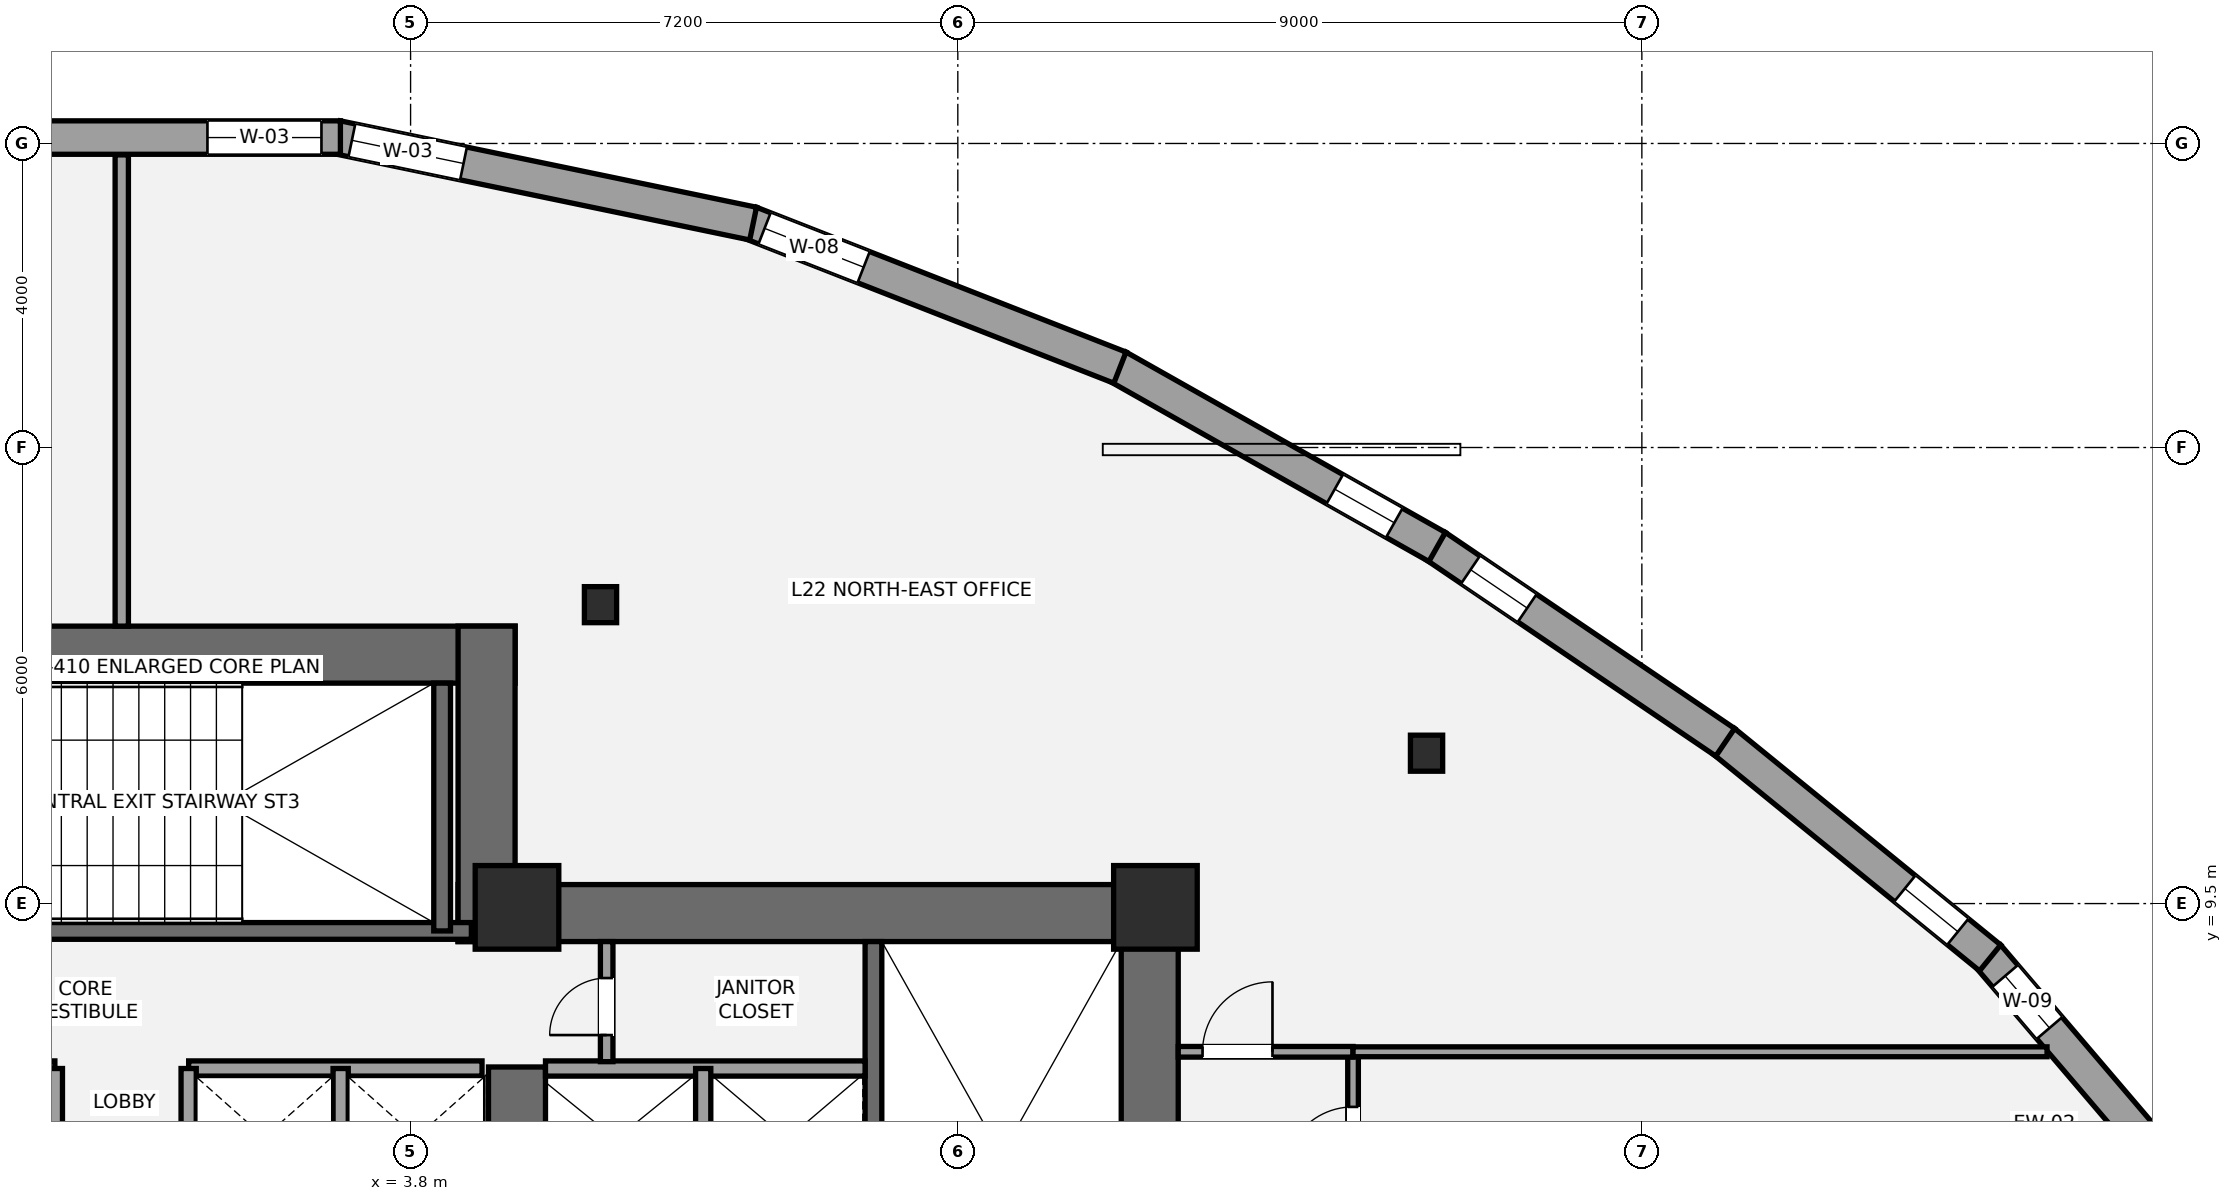
"""IFC4 building model, lengths in metres.
Left out: names, types, materials, properties, quantities, classifications, styles, units other than length and angle.
Written with IfcOpenShell. Run it as: python <this file> out.ifc"""

import sys

from ifc_helpers import new_model, si_unit, direction, frame, frame_2d, origin, origin_2d, place, context, subcontext, project, spatial, rectangle, i_section, extrude, element, fill, save


model = new_model("IFC4")
c1 = context("Model", 3, precision=1e-05, world=origin(), true_north=direction((0.0, 1.0)))
c2 = subcontext(c1, "Body", "Model", "MODEL_VIEW")
j1 = project(units=[si_unit("LENGTHUNIT", "METRE"), si_unit("PLANEANGLEUNIT", "RADIAN")], contexts=[c1])
p1 = place(None, origin())
s1 = spatial("IfcSite", under=j1, at=p1, CompositionType="ELEMENT")
p2 = place(p1, origin())
s2 = spatial("IfcBuilding", under=s1, at=p2, CompositionType="ELEMENT")
p3 = place(p2, frame((0.0, 0.0, 86.1)))
s3 = spatial("IfcBuildingStorey", under=s2, at=p3, CompositionType="ELEMENT", Elevation=86.1)
p4 = place(p3, frame((13.525, 1.1, 0.0), z_axis=(0.0, 0.0, 1.0), x_axis=(0.0, 1.0, 0.0)))
e1 = element("IfcWall", 1, at=p4, inside=s3, PredefinedType="SHEAR", context=c2, shape_type="SweptSolid", body=[
    extrude(rectangle(XDim=8.65, YDim=0.75, at=frame_2d((4.325, 0.0))), origin(), (0.0, 0.0, 1.0), 3.5),
])
p5 = place(p3, frame((4.425, 9.375, 0.0), z_axis=(0.0, 0.0, 1.0), x_axis=(1.0, 0.0, 0.0)))
e2 = element("IfcWall", 2, at=p5, inside=s3, PredefinedType="SHEAR", context=c2, shape_type="SweptSolid", body=[
    extrude(rectangle(XDim=9.475, YDim=0.75, at=frame_2d((4.737, 0.0))), origin(), (0.0, 0.0, 1.0), 3.5),
])
p6 = place(p3, frame((5.2, 5.35, 0.0), z_axis=(0.0, 0.0, 1.0), x_axis=(0.0, 1.0, 0.0)))
e3 = element("IfcWall", 3, at=p6, inside=s3, PredefinedType="SHEAR", context=c2, shape_type="SweptSolid", body=[
    extrude(rectangle(XDim=2.0, YDim=0.75, at=frame_2d((1.0, 0.0))), origin(), (0.0, 0.0, 1.0), 3.5),
])
p7 = place(p3, frame((9.89, 1.85, 0.0), z_axis=(0.0, 0.0, 1.0), x_axis=(0.0, 1.0, 0.0)))
e4 = element("IfcWall", 4, at=p7, inside=s3, PredefinedType="SHEAR", context=c2, shape_type="SweptSolid", body=[
    extrude(rectangle(XDim=7.15, YDim=0.22, at=frame_2d((3.575, 0.0))), origin(), (0.0, 0.0, 1.0), 3.5),
])
p8 = place(p3, frame((-5.175, 12.775, 0.0), z_axis=(0.0, 0.0, 1.0), x_axis=(1.0, 0.0, 0.0)))
e5 = element("IfcWall", 5, at=p8, inside=s3, PredefinedType="SHEAR", context=c2, shape_type="SweptSolid", body=[
    extrude(rectangle(XDim=10.35, YDim=0.75, at=frame_2d((5.175, 0.0))), origin(), (0.0, 0.0, 1.0), 3.5),
])
p9 = place(p3, frame((4.8, 9.0, 0.0), z_axis=(0.0, 0.0, 1.0), x_axis=(0.0, 1.0, 0.0)))
e6 = element("IfcWall", 6, at=p9, inside=s3, PredefinedType="SHEAR", context=c2, shape_type="SweptSolid", body=[
    extrude(rectangle(XDim=4.15, YDim=0.75, at=frame_2d((2.075, 0.0))), origin(), (0.0, 0.0, 1.0), 3.5),
])
p10 = place(p3, frame((-4.7, 9.14, 0.0), z_axis=(0.0, 0.0, 1.0), x_axis=(1.0, 0.0, 0.0)))
e7 = element("IfcWall", 7, at=p10, inside=s3, PredefinedType="SHEAR", context=c2, shape_type="SweptSolid", body=[
    extrude(rectangle(XDim=9.3, YDim=0.22, at=frame_2d((4.65, 0.0))), origin(), (0.0, 0.0, 1.0), 3.5),
])
p11 = place(p10, frame((1.15, 0.0, 0.0)))
e8 = element("IfcOpeningElement", 8, at=p11, cuts=e7, PredefinedType="OPENING", context=c2, shape_type="SweptSolid", body=[
    extrude(rectangle(XDim=1.05, YDim=2.15, at=frame_2d((0.525, 1.075))), frame((0.0, 0.12, 0.0), z_axis=(0.0, -1.0, 0.0), x_axis=(1.0, 0.0, 0.0)), (0.0, 0.0, 1.0), 0.24),
])
p12 = place(p3, frame((4.215, 9.14, 0.0), z_axis=(0.0, 0.0, 1.0), x_axis=(0.0, 1.0, 0.0)))
e9 = element("IfcWall", 9, at=p12, inside=s3, PredefinedType="SHEAR", context=c2, shape_type="SweptSolid", body=[
    extrude(rectangle(XDim=3.26, YDim=0.22, at=frame_2d((1.63, 0.0))), origin(), (0.0, 0.0, 1.0), 3.5),
])
for number, where, z_axis, x_axis in (
    (10, (5.2, 9.45, 0.0), (0.0, 0.0, 1.0), (1.0, 0.0, 0.0)),
    (11, (13.6, 9.45, 0.0), (0.0, 0.0, 1.0), (1.0, 0.0, 0.0)),
):
    element("IfcColumn", number, at=place(p3, frame(where, z_axis=z_axis, x_axis=x_axis)), inside=s3, PredefinedType="COLUMN", context=c2, shape_type="SweptSolid", body=[
        extrude(rectangle(XDim=1.1, YDim=1.1, at=origin_2d()), origin(), (0.0, 0.0, 1.0), 3.5),
    ])
for number, where, z_axis, x_axis in (
    (12, (17.167, 11.478, 0.0), (0.0, 0.0, 1.0), (1.0, 0.0, 0.0)),
    (13, (6.299, 13.433, 0.0), (0.0, 0.0, 1.0), (1.0, 0.0, 0.0)),
):
    element("IfcColumn", number, at=place(p3, frame(where, z_axis=z_axis, x_axis=x_axis)), inside=s3, PredefinedType="COLUMN", context=c2, shape_type="SweptSolid", body=[
        extrude(i_section(OverallWidth=0.424, OverallDepth=0.474, WebThickness=0.048, FlangeThickness=0.077, at=origin_2d()), origin(), (0.0, 0.0, 1.0), 3.5),
    ])
p13 = place(p3, frame((24.553, 8.813, 0.0), z_axis=(0.0, 0.0, 1.0), x_axis=(0.648913975558, -0.760861782669, 0.0)))
e14 = element("IfcWall", 14, at=p13, inside=s3, PredefinedType="STANDARD", context=c2, shape_type="SweptSolid", body=[
    extrude(rectangle(XDim=4.331, YDim=0.44, at=frame_2d((2.166, 0.0))), origin(), (0.0, 0.0, 1.0), 2.528),
])
p14 = place(p13, frame((0.349, 0.0, 0.58)))
e15 = element("IfcOpeningElement", 15, at=p14, cuts=e14, PredefinedType="OPENING", context=c2, shape_type="SweptSolid", body=[
    extrude(rectangle(XDim=0.9, YDim=1.35, at=frame_2d((0.45, 0.675))), frame((0.0, 0.23, 0.0), z_axis=(0.0, -1.0, 0.0), x_axis=(1.0, 0.0, 0.0)), (0.0, 0.0, 1.0), 0.46),
])
p15 = place(p3, frame((21.081, 11.633, 0.0), z_axis=(0.0, 0.0, 1.0), x_axis=(0.775728286929, -0.631067052585, 0.0)))
e16 = element("IfcWall", 16, at=p15, inside=s3, PredefinedType="STANDARD", context=c2, shape_type="SweptSolid", body=[
    extrude(rectangle(XDim=4.513, YDim=0.44, at=frame_2d((2.256, 0.0))), origin(), (0.0, 0.0, 1.0), 2.528),
])
p16 = place(p15, frame((3.067, 0.0, 0.58)))
e17 = element("IfcOpeningElement", 17, at=p16, cuts=e16, PredefinedType="OPENING", context=c2, shape_type="SweptSolid", body=[
    extrude(rectangle(XDim=0.9, YDim=1.35, at=frame_2d((0.45, 0.675))), frame((0.0, 0.23, 0.0), z_axis=(0.0, -1.0, 0.0), x_axis=(1.0, 0.0, 0.0)), (0.0, 0.0, 1.0), 0.46),
])
p17 = place(p3, frame((17.291, 14.201, 0.0), z_axis=(0.0, 0.0, 1.0), x_axis=(0.827777061901, -0.561057159112, 0.0)))
e18 = element("IfcWall", 18, at=p17, inside=s3, PredefinedType="STANDARD", context=c2, shape_type="SweptSolid", body=[
    extrude(rectangle(XDim=4.597, YDim=0.44, at=frame_2d((2.298, 0.0))), origin(), (0.0, 0.0, 1.0), 2.528),
])
p18 = place(p17, frame((0.55, 0.0, 0.58)))
e19 = element("IfcOpeningElement", 19, at=p18, cuts=e18, PredefinedType="OPENING", context=c2, shape_type="SweptSolid", body=[
    extrude(rectangle(XDim=0.9, YDim=1.35, at=frame_2d((0.45, 0.675))), frame((0.0, 0.23, 0.0), z_axis=(0.0, -1.0, 0.0), x_axis=(1.0, 0.0, 0.0)), (0.0, 0.0, 1.0), 0.46),
])
p19 = place(p3, frame((13.105, 16.564, 0.0), z_axis=(0.0, 0.0, 1.0), x_axis=(0.870732411856, -0.491757121903, 0.0)))
e20 = element("IfcWall", 20, at=p19, inside=s3, PredefinedType="STANDARD", context=c2, shape_type="SweptSolid", body=[
    extrude(rectangle(XDim=4.825, YDim=0.44, at=frame_2d((2.413, 0.0))), origin(), (0.0, 0.0, 1.0), 2.528),
])
p20 = place(p19, frame((3.278, 0.0, 0.58)))
e21 = element("IfcOpeningElement", 21, at=p20, cuts=e20, PredefinedType="OPENING", context=c2, shape_type="SweptSolid", body=[
    extrude(rectangle(XDim=0.9, YDim=1.35, at=frame_2d((0.45, 0.675))), frame((0.0, 0.23, 0.0), z_axis=(0.0, -1.0, 0.0), x_axis=(1.0, 0.0, 0.0)), (0.0, 0.0, 1.0), 0.46),
])
p21 = place(p3, frame((8.271, 18.456, 0.0), z_axis=(0.0, 0.0, 1.0), x_axis=(0.931059171354, -0.364868222017, 0.0)))
e22 = element("IfcWall", 22, at=p21, inside=s3, PredefinedType="STANDARD", context=c2, shape_type="SweptSolid", body=[
    extrude(rectangle(XDim=5.222, YDim=0.44, at=frame_2d((2.611, 0.0))), origin(), (0.0, 0.0, 1.0), 2.528),
])
p22 = place(p21, frame((0.2, 0.0, 0.58)))
e23 = element("IfcOpeningElement", 23, at=p22, cuts=e22, PredefinedType="OPENING", context=c2, shape_type="SweptSolid", body=[
    extrude(rectangle(XDim=1.4, YDim=1.55, at=frame_2d((0.7, 0.775))), frame((0.0, 0.23, 0.0), z_axis=(0.0, -1.0, 0.0), x_axis=(1.0, 0.0, 0.0)), (0.0, 0.0, 1.0), 0.46),
])
p23 = place(p3, frame((2.832, 19.582, 0.0), z_axis=(0.0, 0.0, 1.0), x_axis=(0.979118590293, -0.20328990664, 0.0)))
e24 = element("IfcWall", 24, at=p23, inside=s3, PredefinedType="STANDARD", context=c2, shape_type="SweptSolid", body=[
    extrude(rectangle(XDim=5.592, YDim=0.44, at=frame_2d((2.796, 0.0))), origin(), (0.0, 0.0, 1.0), 2.528),
])
p24 = place(p23, frame((0.2, 0.0, 0.65)))
e25 = element("IfcOpeningElement", 25, at=p24, cuts=e24, PredefinedType="OPENING", context=c2, shape_type="SweptSolid", body=[
    extrude(rectangle(XDim=1.5, YDim=1.7, at=frame_2d((0.75, 0.85))), frame((0.0, 0.23, 0.0), z_axis=(0.0, -1.0, 0.0), x_axis=(1.0, 0.0, 0.0)), (0.0, 0.0, 1.0), 0.46),
])
p25 = place(p3, frame((-2.877, 19.578, 0.0), z_axis=(0.0, 0.0, 1.0), x_axis=(1.0, 0.0, 0.0)))
e26 = element("IfcWall", 26, at=p25, inside=s3, PredefinedType="STANDARD", context=c2, shape_type="SweptSolid", body=[
    extrude(rectangle(XDim=5.753, YDim=0.44, at=frame_2d((2.877, 0.0))), origin(), (0.0, 0.0, 1.0), 2.528),
])
p26 = place(p25, frame((4.004, 0.0, 0.65)))
e27 = element("IfcOpeningElement", 27, at=p26, cuts=e26, PredefinedType="OPENING", context=c2, shape_type="SweptSolid", body=[
    extrude(rectangle(XDim=1.5, YDim=1.7, at=frame_2d((0.75, 0.85))), frame((0.0, 0.23, 0.0), z_axis=(0.0, -1.0, 0.0), x_axis=(1.0, 0.0, 0.0)), (0.0, 0.0, 1.0), 0.46),
])
p27 = place(p3, frame((5.575, 7.33, 0.0), z_axis=(0.0, 0.0, 1.0), x_axis=(1.0, 0.0, 0.0)))
e28 = element("IfcWall", 28, at=p27, inside=s3, PredefinedType="SOLIDWALL", context=c2, shape_type="SweptSolid", body=[
    extrude(rectangle(XDim=4.205, YDim=0.2, at=frame_2d((2.103, 0.0))), origin(), (0.0, 0.0, 1.0), 3.31),
])
p28 = place(p3, frame((7.65, 5.47, 0.0), z_axis=(0.0, 0.0, 1.0), x_axis=(0.0, 1.0, 0.0)))
e29 = element("IfcWall", 29, at=p28, inside=s3, PredefinedType="SOLIDWALL", context=c2, shape_type="SweptSolid", body=[
    extrude(rectangle(XDim=1.86, YDim=0.2, at=frame_2d((0.93, 0.0))), origin(), (0.0, 0.0, 1.0), 3.31),
])
for number, where, z_axis, x_axis in (
    (30, (-4.74, 7.33, 0.0), (0.0, 0.0, 1.0), (1.0, 0.0, 0.0)),
    (31, (0.88, 7.33, 0.0), (0.0, 0.0, 1.0), (1.0, 0.0, 0.0)),
):
    element("IfcWall", number, at=place(p3, frame(where, z_axis=z_axis, x_axis=x_axis)), inside=s3, PredefinedType="SOLIDWALL", context=c2, shape_type="SweptSolid", body=[
        extrude(rectangle(XDim=3.86, YDim=0.2, at=frame_2d((1.93, 0.0))), origin(), (0.0, 0.0, 1.0), 3.31),
    ])
for number, where, z_axis, x_axis in (
    (32, (2.88, 5.52, 0.0), (0.0, 0.0, 1.0), (0.0, 1.0, 0.0)),
    (33, (-0.88, 5.52, 0.0), (0.0, 0.0, 1.0), (0.0, 1.0, 0.0)),
    (34, (0.88, 5.52, 0.0), (0.0, 0.0, 1.0), (0.0, 1.0, 0.0)),
):
    element("IfcWall", number, at=place(p3, frame(where, z_axis=z_axis, x_axis=x_axis)), inside=s3, PredefinedType="SOLIDWALL", context=c2, shape_type="SweptSolid", body=[
        extrude(rectangle(XDim=1.81, YDim=0.2, at=frame_2d((0.905, 0.0))), origin(), (0.0, 0.0, 1.0), 3.31),
    ])
p29 = place(p3, frame((6.38, 7.42, 0.0), z_axis=(0.0, 0.0, 1.0), x_axis=(0.0, 1.0, 0.0)))
e35 = element("IfcWall", 35, at=p29, inside=s3, PredefinedType="PARTITIONING", context=c2, shape_type="SweptSolid", body=[
    extrude(rectangle(XDim=1.58, YDim=0.165, at=frame_2d((0.79, 0.0))), origin(), (0.0, 0.0, 1.0), 3.31),
])
p30 = place(p29, frame((0.35, 0.0, 0.0)))
e36 = element("IfcOpeningElement", 36, at=p30, cuts=e35, PredefinedType="OPENING", context=c2, shape_type="SweptSolid", body=[
    extrude(rectangle(XDim=0.75, YDim=2.1, at=frame_2d((0.375, 1.05))), frame((0.0, 0.093, 0.0), z_axis=(0.0, -1.0, 0.0), x_axis=(1.0, 0.0, 0.0)), (0.0, 0.0, 1.0), 0.185),
])
p31 = place(p3, frame((16.2, -14.554, 0.0), z_axis=(0.0, 0.0, 1.0), x_axis=(0.0, 1.0, 0.0)))
e37 = element("IfcWall", 37, at=p31, inside=s3, PredefinedType="PARTITIONING", context=c2, shape_type="SweptSolid", body=[
    extrude(rectangle(XDim=22.104, YDim=0.14, at=frame_2d((11.052, 0.0))), origin(), (0.0, 0.0, 1.0), 2.751),
])
p32 = place(p31, frame((10.304, 0.0, 0.0)))
e38 = element("IfcOpeningElement", 38, at=p32, cuts=e37, PredefinedType="OPENING", context=c2, shape_type="SweptSolid", body=[
    extrude(rectangle(XDim=0.9, YDim=2.1, at=frame_2d((0.45, 1.05))), frame((0.0, 0.08, 0.0), z_axis=(0.0, -1.0, 0.0), x_axis=(1.0, 0.0, 0.0)), (0.0, 0.0, 1.0), 0.16),
])
p33 = place(p31, frame((14.204, 0.0, 0.0)))
e39 = element("IfcOpeningElement", 39, at=p33, cuts=e37, PredefinedType="OPENING", context=c2, shape_type="SweptSolid", body=[
    extrude(rectangle(XDim=0.9, YDim=2.1, at=frame_2d((0.45, 1.05))), frame((0.0, 0.08, 0.0), z_axis=(0.0, -1.0, 0.0), x_axis=(1.0, 0.0, 0.0)), (0.0, 0.0, 1.0), 0.16),
])
p34 = place(p31, frame((17.704, 0.0, 0.0)))
e40 = element("IfcOpeningElement", 40, at=p34, cuts=e37, PredefinedType="OPENING", context=c2, shape_type="SweptSolid", body=[
    extrude(rectangle(XDim=0.9, YDim=2.1, at=frame_2d((0.45, 1.05))), frame((0.0, 0.08, 0.0), z_axis=(0.0, -1.0, 0.0), x_axis=(1.0, 0.0, 0.0)), (0.0, 0.0, 1.0), 0.16),
])
p35 = place(p31, frame((20.479, 0.0, 0.0)))
e41 = element("IfcOpeningElement", 41, at=p35, cuts=e37, PredefinedType="OPENING", context=c2, shape_type="SweptSolid", body=[
    extrude(rectangle(XDim=0.9, YDim=2.1, at=frame_2d((0.45, 1.05))), frame((0.0, 0.08, 0.0), z_axis=(0.0, -1.0, 0.0), x_axis=(1.0, 0.0, 0.0)), (0.0, 0.0, 1.0), 0.16),
])
p36 = place(p3, frame((13.9, 7.55, 0.0), z_axis=(0.0, 0.0, 1.0), x_axis=(1.0, 0.0, 0.0)))
e42 = element("IfcWall", 42, at=p36, inside=s3, PredefinedType="PARTITIONING", context=c2, shape_type="SweptSolid", body=[
    extrude(rectangle(XDim=2.3, YDim=0.14, at=frame_2d((1.15, 0.0))), origin(), (0.0, 0.0, 1.0), 2.763),
])
p37 = place(p36, frame((0.32, 0.0, 0.0)))
e43 = element("IfcOpeningElement", 43, at=p37, cuts=e42, PredefinedType="OPENING", context=c2, shape_type="SweptSolid", body=[
    extrude(rectangle(XDim=0.92, YDim=2.15, at=frame_2d((0.46, 1.075))), frame((0.0, 0.08, 0.0), z_axis=(0.0, -1.0, 0.0), x_axis=(1.0, 0.0, 0.0)), (0.0, 0.0, 1.0), 0.16),
])
p38 = place(p3, frame((0.0, 13.15, 0.0), z_axis=(0.0, 0.0, 1.0), x_axis=(0.0, 1.0, 0.0)))
e44 = element("IfcWall", 44, at=p38, inside=s3, PredefinedType="PARTITIONING", context=c2, shape_type="SweptSolid", body=[
    extrude(rectangle(XDim=6.2, YDim=0.175, at=frame_2d((3.1, 0.0))), origin(), (0.0, 0.0, 1.0), 2.763),
])
p39 = place(p3, frame((16.2, 7.55, 0.0), z_axis=(0.0, 0.0, 1.0), x_axis=(1.0, 0.0, 0.0)))
e45 = element("IfcWall", 45, at=p39, inside=s3, PredefinedType="PARTITIONING", context=c2, shape_type="SweptSolid", body=[
    extrude(rectangle(XDim=9.131, YDim=0.13, at=frame_2d((4.565, 0.0))), origin(), (0.0, 0.0, 1.0), 2.763),
])
p40 = place(p14, origin())
e46 = element("IfcWindow", 46, at=p40, inside=s3, PartitioningType="SINGLE_PANEL", PredefinedType="WINDOW", context=c2, shape_type="SweptSolid", body=[
    extrude(rectangle(XDim=0.9, YDim=1.35, at=frame_2d((0.45, 0.675))), frame((0.0, -0.01, 0.0), z_axis=(0.0, -1.0, 0.0), x_axis=(1.0, 0.0, 0.0)), (0.0, 0.0, 1.0), 0.06),
])
fill(e15, e46)
p41 = place(p16, origin())
e47 = element("IfcWindow", 47, at=p41, inside=s3, PartitioningType="SINGLE_PANEL", PredefinedType="WINDOW", context=c2, shape_type="SweptSolid", body=[
    extrude(rectangle(XDim=0.9, YDim=1.35, at=frame_2d((0.45, 0.675))), frame((0.0, -0.01, 0.0), z_axis=(0.0, -1.0, 0.0), x_axis=(1.0, 0.0, 0.0)), (0.0, 0.0, 1.0), 0.06),
])
fill(e17, e47)
p42 = place(p18, origin())
e48 = element("IfcWindow", 48, at=p42, inside=s3, PartitioningType="SINGLE_PANEL", PredefinedType="WINDOW", context=c2, shape_type="SweptSolid", body=[
    extrude(rectangle(XDim=0.9, YDim=1.35, at=frame_2d((0.45, 0.675))), frame((0.0, -0.01, 0.0), z_axis=(0.0, -1.0, 0.0), x_axis=(1.0, 0.0, 0.0)), (0.0, 0.0, 1.0), 0.06),
])
fill(e19, e48)
p43 = place(p20, origin())
e49 = element("IfcWindow", 49, at=p43, inside=s3, PartitioningType="SINGLE_PANEL", PredefinedType="WINDOW", context=c2, shape_type="SweptSolid", body=[
    extrude(rectangle(XDim=0.9, YDim=1.35, at=frame_2d((0.45, 0.675))), frame((0.0, -0.01, 0.0), z_axis=(0.0, -1.0, 0.0), x_axis=(1.0, 0.0, 0.0)), (0.0, 0.0, 1.0), 0.06),
])
fill(e21, e49)
p44 = place(p22, origin())
e50 = element("IfcWindow", 50, at=p44, inside=s3, PartitioningType="SINGLE_PANEL", PredefinedType="WINDOW", context=c2, shape_type="SweptSolid", body=[
    extrude(rectangle(XDim=1.4, YDim=1.55, at=frame_2d((0.7, 0.775))), frame((0.0, -0.01, 0.0), z_axis=(0.0, -1.0, 0.0), x_axis=(1.0, 0.0, 0.0)), (0.0, 0.0, 1.0), 0.06),
])
fill(e23, e50)
p45 = place(p24, origin())
e51 = element("IfcWindow", 51, at=p45, inside=s3, PartitioningType="SINGLE_PANEL", PredefinedType="WINDOW", context=c2, shape_type="SweptSolid", body=[
    extrude(rectangle(XDim=1.5, YDim=1.7, at=frame_2d((0.75, 0.85))), frame((0.0, -0.01, 0.0), z_axis=(0.0, -1.0, 0.0), x_axis=(1.0, 0.0, 0.0)), (0.0, 0.0, 1.0), 0.06),
])
fill(e25, e51)
p46 = place(p26, origin())
e52 = element("IfcWindow", 52, at=p46, inside=s3, PartitioningType="SINGLE_PANEL", PredefinedType="WINDOW", context=c2, shape_type="SweptSolid", body=[
    extrude(rectangle(XDim=1.5, YDim=1.7, at=frame_2d((0.75, 0.85))), frame((0.0, -0.01, 0.0), z_axis=(0.0, -1.0, 0.0), x_axis=(1.0, 0.0, 0.0)), (0.0, 0.0, 1.0), 0.06),
])
fill(e27, e52)
p47 = place(p30, origin())
e53 = element("IfcDoor", 53, at=p47, inside=s3, OperationType="SINGLE_SWING_LEFT", PredefinedType="DOOR", context=c2, shape_type="SweptSolid", body=[
    extrude(rectangle(XDim=0.75, YDim=2.1, at=frame_2d((0.375, 1.05))), frame((0.0, 0.025, 0.0), z_axis=(0.0, -1.0, 0.0), x_axis=(1.0, 0.0, 0.0)), (0.0, 0.0, 1.0), 0.05),
])
fill(e36, e53)
p48 = place(p37, origin())
e54 = element("IfcDoor", 54, at=p48, inside=s3, OperationType="SINGLE_SWING_RIGHT", PredefinedType="DOOR", context=c2, shape_type="SweptSolid", body=[
    extrude(rectangle(XDim=0.92, YDim=2.15, at=frame_2d((0.46, 1.075))), frame((0.0, 0.025, 0.0), z_axis=(0.0, -1.0, 0.0), x_axis=(1.0, 0.0, 0.0)), (0.0, 0.0, 1.0), 0.05),
])
fill(e43, e54)
p49 = place(p35, origin())
e55 = element("IfcDoor", 55, at=p49, inside=s3, OperationType="SINGLE_SWING_LEFT", PredefinedType="DOOR", context=c2, shape_type="SweptSolid", body=[
    extrude(rectangle(XDim=0.9, YDim=2.1, at=frame_2d((0.45, 1.05))), frame((0.0, 0.025, 0.0), z_axis=(0.0, -1.0, 0.0), x_axis=(1.0, 0.0, 0.0)), (0.0, 0.0, 1.0), 0.05),
])
fill(e41, e55)
save(model, sys.argv[1])
